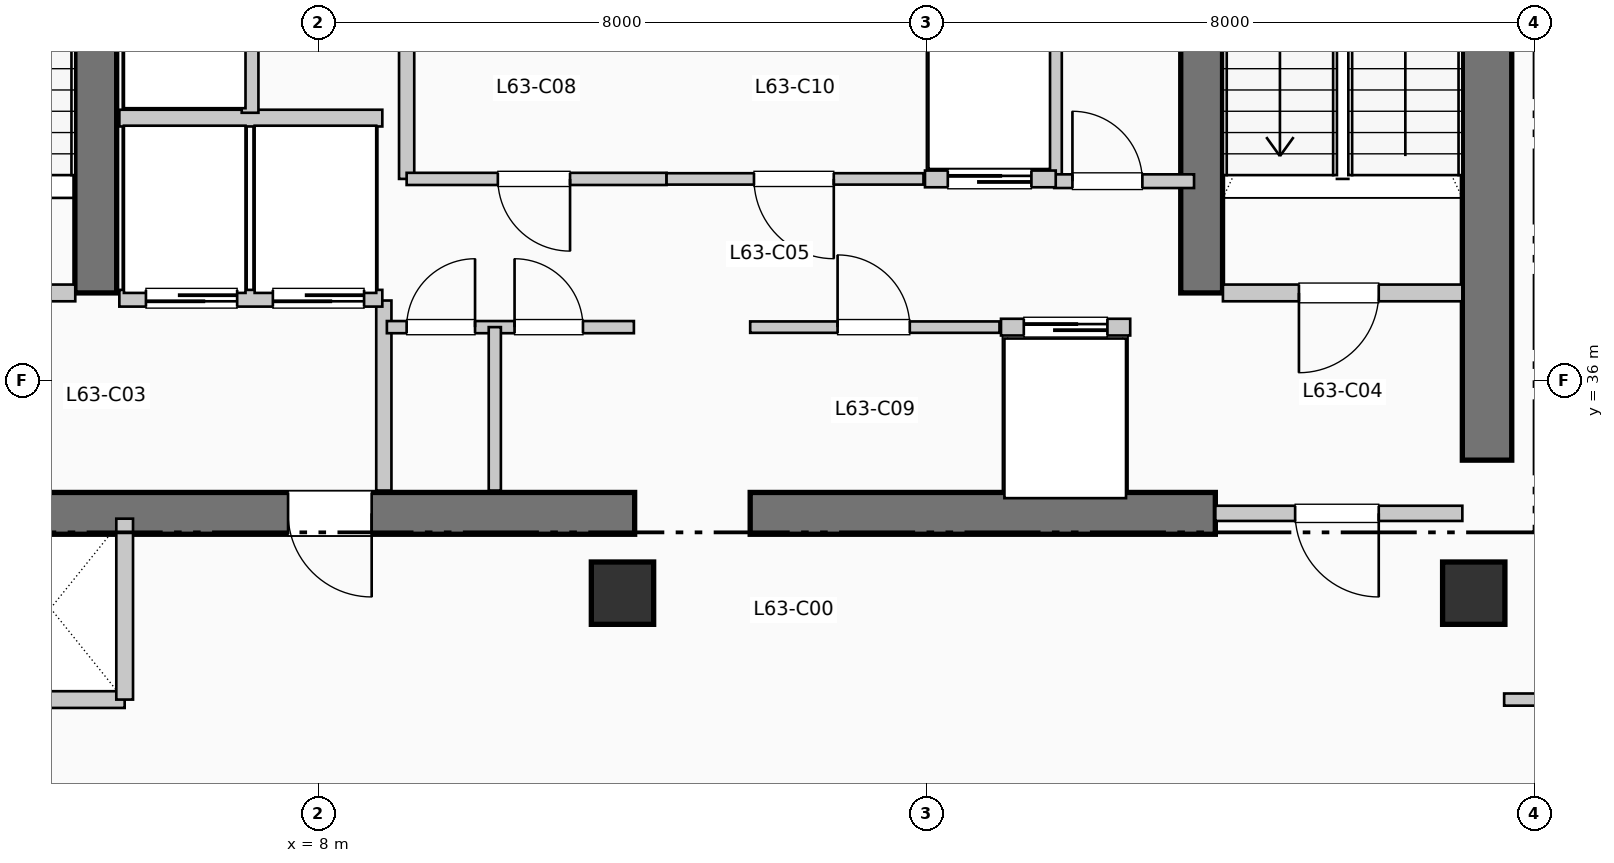
"""IFC4 building model, lengths in metres.
Left out: names, types, materials, properties, quantities, classifications, styles, units other than length and angle.
Written with IfcOpenShell. Run it as: python <this file> out.ifc"""

import sys

from ifc_helpers import new_model, si_unit, direction, frame, frame_2d, origin, origin_2d, place, context, subcontext, project, spatial, rectangle, extrude, element, fill, save


model = new_model("IFC4")
c1 = context("Model", 3, precision=1e-05, world=origin(), true_north=direction((0.0, 1.0)))
c2 = subcontext(c1, "Body", "Model", "MODEL_VIEW")
j1 = project(units=[si_unit("LENGTHUNIT", "METRE"), si_unit("PLANEANGLEUNIT", "RADIAN")], contexts=[c1])
p1 = place(None, origin())
s1 = spatial("IfcSite", under=j1, at=p1, CompositionType="ELEMENT")
p2 = place(p1, origin())
s2 = spatial("IfcBuilding", under=s1, at=p2, CompositionType="ELEMENT")
p3 = place(p2, frame((0.0, 0.0, 260.37)))
s3 = spatial("IfcBuildingStorey", under=s2, at=p3, CompositionType="ELEMENT", Elevation=260.37)
p4 = place(p3, frame((23.375, 34.95, 0.0), z_axis=(0.0, 0.0, 1.0), x_axis=(0.0, 1.0, 0.0)))
e1 = element("IfcWall", 1, at=p4, inside=s3, PredefinedType="SHEAR", context=c2, shape_type="SweptSolid", body=[
    extrude(rectangle(XDim=10.64, YDim=0.65, at=frame_2d((5.32, 0.0))), origin(), (0.0, 0.0, 1.0), 3.96),
])
p5 = place(p3, frame((1.45, 34.25, 0.0), z_axis=(0.0, 0.0, 1.0), x_axis=(1.0, 0.0, 0.0)))
e2 = element("IfcWall", 2, at=p5, inside=s3, PredefinedType="SHEAR", context=c2, shape_type="SweptSolid", body=[
    extrude(rectangle(XDim=10.71, YDim=0.55, at=frame_2d((5.355, 0.0))), origin(), (0.0, 0.0, 1.0), 3.96),
])
p6 = place(p5, frame((7.25, 0.0, 0.0), z_axis=(0.0, 0.0, 1.0), x_axis=(-1.0, 0.0, 0.0)))
e3 = element("IfcOpeningElement", 3, at=p6, cuts=e2, PredefinedType="OPENING", context=c2, shape_type="SweptSolid", body=[
    extrude(rectangle(XDim=1.1, YDim=2.15, at=frame_2d((0.55, 1.075))), frame((0.0, 0.285, 0.0), z_axis=(0.0, -1.0, 0.0), x_axis=(1.0, 0.0, 0.0)), (0.0, 0.0, 1.0), 0.57),
])
p7 = place(p3, frame((13.68, 34.25, 0.0), z_axis=(0.0, 0.0, 1.0), x_axis=(1.0, 0.0, 0.0)))
e4 = element("IfcWall", 4, at=p7, inside=s3, PredefinedType="SHEAR", context=c2, shape_type="SweptSolid", body=[
    extrude(rectangle(XDim=6.12, YDim=0.55, at=frame_2d((3.06, 0.0))), origin(), (0.0, 0.0, 1.0), 3.96),
])
for number, where, z_axis, x_axis in (
    (5, (5.07, 37.15, 0.0), (0.0, 0.0, 1.0), (0.0, 1.0, 0.0)),
    (6, (19.62, 37.15, 0.0), (0.0, 0.0, 1.0), (0.0, 1.0, 0.0)),
):
    element("IfcWall", number, at=place(p3, frame(where, z_axis=z_axis, x_axis=x_axis)), inside=s3, PredefinedType="SHEAR", context=c2, shape_type="SweptSolid", body=[
        extrude(rectangle(XDim=7.89, YDim=0.55, at=frame_2d((3.945, 0.0))), origin(), (0.0, 0.0, 1.0), 3.96),
    ])
for number, where, z_axis, x_axis in (
    (7, (12.0, 33.2, 0.0), (0.0, 0.0, 1.0), (1.0, 0.0, 0.0)),
    (8, (23.2, 33.2, 0.0), (0.0, 0.0, 1.0), (1.0, 0.0, 0.0)),
):
    element("IfcColumn", number, at=place(p3, frame(where, z_axis=z_axis, x_axis=x_axis)), inside=s3, PredefinedType="COLUMN", context=c2, shape_type="SweptSolid", body=[
        extrude(rectangle(XDim=0.82, YDim=0.82, at=origin_2d()), origin(), (0.0, 0.0, 1.0), 3.96),
    ])
p8 = place(p3, frame((1.65, 37.15, 0.0), z_axis=(0.0, 0.0, 1.0), x_axis=(1.0, 0.0, 0.0)))
e9 = element("IfcWall", 9, at=p8, inside=s3, PredefinedType="PARTITIONING", context=c2, shape_type="SweptSolid", body=[
    extrude(rectangle(XDim=3.15, YDim=0.22, at=frame_2d((1.575, 0.0))), origin(), (0.0, 0.0, 1.0), 3.71),
])
p9 = place(p8, frame((2.05, 0.0, 0.0), z_axis=(0.0, 0.0, 1.0), x_axis=(-1.0, 0.0, 0.0)))
e10 = element("IfcOpeningElement", 10, at=p9, cuts=e9, PredefinedType="OPENING", context=c2, shape_type="SweptSolid", body=[
    extrude(rectangle(XDim=1.05, YDim=2.15, at=frame_2d((0.525, 1.075))), frame((0.0, 0.12, 0.0), z_axis=(0.0, -1.0, 0.0), x_axis=(1.0, 0.0, 0.0)), (0.0, 0.0, 1.0), 0.24),
])
p10 = place(p3, frame((8.86, 34.55, 0.0), z_axis=(0.0, 0.0, 1.0), x_axis=(0.0, 1.0, 0.0)))
e11 = element("IfcWall", 11, at=p10, inside=s3, PredefinedType="PARTITIONING", context=c2, shape_type="SweptSolid", body=[
    extrude(rectangle(XDim=2.5, YDim=0.2, at=frame_2d((1.25, 0.0))), origin(), (0.0, 0.0, 1.0), 3.71),
])
p11 = place(p3, frame((19.9, 37.15, 0.0), z_axis=(0.0, 0.0, 1.0), x_axis=(1.0, 0.0, 0.0)))
e12 = element("IfcWall", 12, at=p11, inside=s3, PredefinedType="PARTITIONING", context=c2, shape_type="SweptSolid", body=[
    extrude(rectangle(XDim=3.15, YDim=0.22, at=frame_2d((1.575, 0.0))), origin(), (0.0, 0.0, 1.0), 3.71),
])
p12 = place(p11, frame((2.05, 0.0, 0.0), z_axis=(0.0, 0.0, 1.0), x_axis=(-1.0, 0.0, 0.0)))
e13 = element("IfcOpeningElement", 13, at=p12, cuts=e12, PredefinedType="OPENING", context=c2, shape_type="SweptSolid", body=[
    extrude(rectangle(XDim=1.05, YDim=2.15, at=frame_2d((0.525, 1.075))), frame((0.0, 0.12, 0.0), z_axis=(0.0, -1.0, 0.0), x_axis=(1.0, 0.0, 0.0)), (0.0, 0.0, 1.0), 0.24),
])
p13 = place(p3, frame((19.8, 34.25, 0.0), z_axis=(0.0, 0.0, 1.0), x_axis=(1.0, 0.0, 0.0)))
e14 = element("IfcWall", 14, at=p13, inside=s3, PredefinedType="PARTITIONING", context=c2, shape_type="SweptSolid", body=[
    extrude(rectangle(XDim=3.25, YDim=0.2, at=frame_2d((1.625, 0.0))), origin(), (0.0, 0.0, 1.0), 3.71),
])
p14 = place(p13, frame((2.15, 0.0, 0.0), z_axis=(0.0, 0.0, 1.0), x_axis=(-1.0, 0.0, 0.0)))
e15 = element("IfcOpeningElement", 15, at=p14, cuts=e14, PredefinedType="OPENING", context=c2, shape_type="SweptSolid", body=[
    extrude(rectangle(XDim=1.1, YDim=2.15, at=frame_2d((0.55, 1.075))), frame((0.0, 0.11, 0.0), z_axis=(0.0, -1.0, 0.0), x_axis=(1.0, 0.0, 0.0)), (0.0, 0.0, 1.0), 0.22),
])
p15 = place(p3, frame((5.38, 37.08, 0.0), z_axis=(0.0, 0.0, 1.0), x_axis=(1.0, 0.0, 0.0)))
e16 = element("IfcWall", 16, at=p15, inside=s3, PredefinedType="PARTITIONING", context=c2, shape_type="SweptSolid", body=[
    extrude(rectangle(XDim=3.46, YDim=0.22, at=frame_2d((1.73, 0.0))), origin(), (0.0, 0.0, 1.0), 3.71),
])
p16 = place(p15, frame((1.55, 0.0, 0.0), z_axis=(0.0, 0.0, 1.0), x_axis=(-1.0, 0.0, 0.0)))
e17 = element("IfcOpeningElement", 17, at=p16, cuts=e16, PredefinedType="OPENING", context=c2, shape_type="SweptSolid", body=[
    extrude(rectangle(XDim=1.2, YDim=2.2, at=frame_2d((0.6, 1.1))), frame((0.0, 0.12, 0.0), z_axis=(0.0, -1.0, 0.0), x_axis=(1.0, 0.0, 0.0)), (0.0, 0.0, 1.0), 0.24),
])
p17 = place(p15, frame((3.22, 0.0, 0.0), z_axis=(0.0, 0.0, 1.0), x_axis=(-1.0, 0.0, 0.0)))
e18 = element("IfcOpeningElement", 18, at=p17, cuts=e16, PredefinedType="OPENING", context=c2, shape_type="SweptSolid", body=[
    extrude(rectangle(XDim=1.2, YDim=2.2, at=frame_2d((0.6, 1.1))), frame((0.0, 0.12, 0.0), z_axis=(0.0, -1.0, 0.0), x_axis=(1.0, 0.0, 0.0)), (0.0, 0.0, 1.0), 0.24),
])
p18 = place(p3, frame((5.38, 39.45, 0.0), z_axis=(0.0, 0.0, 1.0), x_axis=(1.0, 0.0, 0.0)))
e19 = element("IfcWall", 19, at=p18, inside=s3, PredefinedType="PARTITIONING", context=c2, shape_type="SweptSolid", body=[
    extrude(rectangle(XDim=3.46, YDim=0.22, at=frame_2d((1.73, 0.0))), origin(), (0.0, 0.0, 1.0), 3.71),
])
p19 = place(p3, frame((7.1, 39.52, 0.0), z_axis=(0.0, 0.0, 1.0), x_axis=(0.0, 1.0, 0.0)))
e20 = element("IfcWall", 20, at=p19, inside=s3, PredefinedType="PARTITIONING", context=c2, shape_type="SweptSolid", body=[
    extrude(rectangle(XDim=2.93, YDim=0.22, at=frame_2d((1.465, 0.0))), origin(), (0.0, 0.0, 1.0), 3.71),
])
p20 = place(p19, frame((0.85, 0.0, 0.0)))
e21 = element("IfcOpeningElement", 21, at=p20, cuts=e20, PredefinedType="OPENING", context=c2, shape_type="SweptSolid", body=[
    extrude(rectangle(XDim=1.1, YDim=2.2, at=frame_2d((0.55, 1.1))), frame((0.0, 0.12, 0.0), z_axis=(0.0, -1.0, 0.0), x_axis=(1.0, 0.0, 0.0)), (0.0, 0.0, 1.0), 0.24),
])
p21 = place(p3, frame((1.55, 31.8, 0.0), z_axis=(0.0, 0.0, 1.0), x_axis=(1.0, 0.0, 0.0)))
e22 = element("IfcWall", 22, at=p21, inside=s3, PredefinedType="PARTITIONING", context=c2, shape_type="SweptSolid", body=[
    extrude(rectangle(XDim=3.9, YDim=0.22, at=frame_2d((1.95, 0.0))), origin(), (0.0, 0.0, 1.0), 3.71),
])
p22 = place(p3, frame((5.45, 31.8, 0.0), z_axis=(0.0, 0.0, 1.0), x_axis=(0.0, 1.0, 0.0)))
e23 = element("IfcWall", 23, at=p22, inside=s3, PredefinedType="PARTITIONING", context=c2, shape_type="SweptSolid", body=[
    extrude(rectangle(XDim=2.38, YDim=0.22, at=frame_2d((1.19, 0.0))), origin(), (0.0, 0.0, 1.0), 3.71),
])
for number, where, z_axis, x_axis in (
    (24, (9.16, 38.65, 0.0), (0.0, 0.0, 1.0), (0.0, 1.0, 0.0)),
    (25, (17.68, 38.65, 0.0), (0.0, 0.0, 1.0), (0.0, 1.0, 0.0)),
):
    element("IfcWall", number, at=place(p3, frame(where, z_axis=z_axis, x_axis=x_axis)), inside=s3, PredefinedType="PARTITIONING", context=c2, shape_type="SweptSolid", body=[
        extrude(rectangle(XDim=2.35, YDim=0.2, at=frame_2d((1.175, 0.0))), origin(), (0.0, 0.0, 1.0), 3.71),
    ])
p23 = place(p3, frame((17.68, 38.62, 0.0), z_axis=(0.0, 0.0, 1.0), x_axis=(1.0, 0.0, 0.0)))
e26 = element("IfcWall", 26, at=p23, inside=s3, PredefinedType="PARTITIONING", context=c2, shape_type="SweptSolid", body=[
    extrude(rectangle(XDim=1.84, YDim=0.18, at=frame_2d((0.92, 0.0))), origin(), (0.0, 0.0, 1.0), 3.71),
])
p24 = place(p23, frame((0.24, 0.0, 0.0)))
e27 = element("IfcOpeningElement", 27, at=p24, cuts=e26, PredefinedType="OPENING", context=c2, shape_type="SweptSolid", body=[
    extrude(rectangle(XDim=0.92, YDim=2.1, at=frame_2d((0.46, 1.05))), frame((0.0, 0.1, 0.0), z_axis=(0.0, -1.0, 0.0), x_axis=(1.0, 0.0, 0.0)), (0.0, 0.0, 1.0), 0.2),
])
p25 = place(p3, frame((8.9, 36.7, 0.0), z_axis=(0.0, 0.0, 1.0), x_axis=(1.0, 0.0, 0.0)))
e28 = element("IfcWall", 28, at=p25, inside=s3, PredefinedType="PARTITIONING", context=c2, shape_type="SweptSolid", body=[
    extrude(rectangle(XDim=3.25, YDim=0.16, at=frame_2d((1.625, 0.0))), origin(), (0.0, 0.0, 1.0), 3.71),
])
p26 = place(p25, frame((0.26, 0.0, 0.0)))
e29 = element("IfcOpeningElement", 29, at=p26, cuts=e28, PredefinedType="OPENING", context=c2, shape_type="SweptSolid", body=[
    extrude(rectangle(XDim=0.9, YDim=2.15, at=frame_2d((0.45, 1.075))), frame((0.0, 0.09, 0.0), z_axis=(0.0, -1.0, 0.0), x_axis=(1.0, 0.0, 0.0)), (0.0, 0.0, 1.0), 0.18),
])
p27 = place(p25, frame((1.68, 0.0, 0.0)))
e30 = element("IfcOpeningElement", 30, at=p27, cuts=e28, PredefinedType="OPENING", context=c2, shape_type="SweptSolid", body=[
    extrude(rectangle(XDim=0.9, YDim=2.15, at=frame_2d((0.45, 1.075))), frame((0.0, 0.09, 0.0), z_axis=(0.0, -1.0, 0.0), x_axis=(1.0, 0.0, 0.0)), (0.0, 0.0, 1.0), 0.18),
])
p28 = place(p3, frame((10.32, 34.55, 0.0), z_axis=(0.0, 0.0, 1.0), x_axis=(0.0, 1.0, 0.0)))
e31 = element("IfcWall", 31, at=p28, inside=s3, PredefinedType="PARTITIONING", context=c2, shape_type="SweptSolid", body=[
    extrude(rectangle(XDim=2.15, YDim=0.16, at=frame_2d((1.075, 0.0))), origin(), (0.0, 0.0, 1.0), 3.71),
])
p29 = place(p3, frame((9.16, 38.65, 0.0), z_axis=(0.0, 0.0, 1.0), x_axis=(1.0, 0.0, 0.0)))
e32 = element("IfcWall", 32, at=p29, inside=s3, PredefinedType="PARTITIONING", context=c2, shape_type="SweptSolid", body=[
    extrude(rectangle(XDim=3.42, YDim=0.16, at=frame_2d((1.71, 0.0))), origin(), (0.0, 0.0, 1.0), 3.71),
])
p30 = place(p29, frame((2.15, 0.0, 0.0), z_axis=(0.0, 0.0, 1.0), x_axis=(-1.0, 0.0, 0.0)))
e33 = element("IfcOpeningElement", 33, at=p30, cuts=e32, PredefinedType="OPENING", context=c2, shape_type="SweptSolid", body=[
    extrude(rectangle(XDim=0.95, YDim=2.15, at=frame_2d((0.475, 1.075))), frame((0.0, 0.09, 0.0), z_axis=(0.0, -1.0, 0.0), x_axis=(1.0, 0.0, 0.0)), (0.0, 0.0, 1.0), 0.18),
])
p31 = place(p3, frame((13.68, 36.7, 0.0), z_axis=(0.0, 0.0, 1.0), x_axis=(1.0, 0.0, 0.0)))
e34 = element("IfcWall", 34, at=p31, inside=s3, PredefinedType="PARTITIONING", context=c2, shape_type="SweptSolid", body=[
    extrude(rectangle(XDim=3.28, YDim=0.15, at=frame_2d((1.64, 0.0))), origin(), (0.0, 0.0, 1.0), 3.71),
])
p32 = place(p31, frame((1.15, 0.0, 0.0)))
e35 = element("IfcOpeningElement", 35, at=p32, cuts=e34, PredefinedType="OPENING", context=c2, shape_type="SweptSolid", body=[
    extrude(rectangle(XDim=0.95, YDim=2.15, at=frame_2d((0.475, 1.075))), frame((0.0, 0.085, 0.0), z_axis=(0.0, -1.0, 0.0), x_axis=(1.0, 0.0, 0.0)), (0.0, 0.0, 1.0), 0.17),
])
p33 = place(p3, frame((12.58, 38.65, 0.0), z_axis=(0.0, 0.0, 1.0), x_axis=(1.0, 0.0, 0.0)))
e36 = element("IfcWall", 36, at=p33, inside=s3, PredefinedType="PARTITIONING", context=c2, shape_type="SweptSolid", body=[
    extrude(rectangle(XDim=3.38, YDim=0.15, at=frame_2d((1.69, 0.0))), origin(), (0.0, 0.0, 1.0), 3.71),
])
p34 = place(p33, frame((2.2, 0.0, 0.0), z_axis=(0.0, 0.0, 1.0), x_axis=(-1.0, 0.0, 0.0)))
e37 = element("IfcOpeningElement", 37, at=p34, cuts=e36, PredefinedType="OPENING", context=c2, shape_type="SweptSolid", body=[
    extrude(rectangle(XDim=1.05, YDim=2.15, at=frame_2d((0.525, 1.075))), frame((0.0, 0.085, 0.0), z_axis=(0.0, -1.0, 0.0), x_axis=(1.0, 0.0, 0.0)), (0.0, 0.0, 1.0), 0.17),
])
p35 = place(p3, frame((16.98, 36.7, 0.0), z_axis=(0.0, 0.0, 1.0), x_axis=(1.0, 0.0, 0.0)))
e38 = element("IfcWall", 38, at=p35, inside=s3, PredefinedType="PARTITIONING", context=c2, shape_type="SweptSolid", body=[
    extrude(rectangle(XDim=1.7, YDim=0.22, at=frame_2d((0.85, 0.0))), origin(), (0.0, 0.0, 1.0), 3.71),
])
p36 = place(p35, frame((0.3, 0.0, 0.0)))
e39 = element("IfcOpeningElement", 39, at=p36, cuts=e38, PredefinedType="OPENING", context=c2, shape_type="SweptSolid", body=[
    extrude(rectangle(XDim=1.1, YDim=2.2, at=frame_2d((0.55, 1.1))), frame((0.0, 0.12, 0.0), z_axis=(0.0, -1.0, 0.0), x_axis=(1.0, 0.0, 0.0)), (0.0, 0.0, 1.0), 0.24),
])
p37 = place(p3, frame((15.98, 38.65, 0.0), z_axis=(0.0, 0.0, 1.0), x_axis=(1.0, 0.0, 0.0)))
e40 = element("IfcWall", 40, at=p37, inside=s3, PredefinedType="PARTITIONING", context=c2, shape_type="SweptSolid", body=[
    extrude(rectangle(XDim=1.72, YDim=0.22, at=frame_2d((0.86, 0.0))), origin(), (0.0, 0.0, 1.0), 3.71),
])
p38 = place(p37, frame((0.3, 0.0, 0.0)))
e41 = element("IfcOpeningElement", 41, at=p38, cuts=e40, PredefinedType="OPENING", context=c2, shape_type="SweptSolid", body=[
    extrude(rectangle(XDim=1.1, YDim=2.2, at=frame_2d((0.55, 1.1))), frame((0.0, 0.12, 0.0), z_axis=(0.0, -1.0, 0.0), x_axis=(1.0, 0.0, 0.0)), (0.0, 0.0, 1.0), 0.24),
])
p39 = place(p3, frame((23.6, 31.8, 0.0), z_axis=(0.0, 0.0, 1.0), x_axis=(1.0, 0.0, 0.0)))
e42 = element("IfcWall", 42, at=p39, inside=s3, PredefinedType="PARTITIONING", context=c2, shape_type="SweptSolid", body=[
    extrude(rectangle(XDim=26.41, YDim=0.16, at=frame_2d((13.205, 0.0))), origin(), (0.0, 0.0, 1.0), 3.71),
])
p40 = place(p39, frame((4.279, 0.0, 0.0)))
e43 = element("IfcOpeningElement", 43, at=p40, cuts=e42, PredefinedType="OPENING", context=c2, shape_type="SweptSolid", body=[
    extrude(rectangle(XDim=0.95, YDim=2.15, at=frame_2d((0.475, 1.075))), frame((0.0, 0.09, 0.0), z_axis=(0.0, -1.0, 0.0), x_axis=(1.0, 0.0, 0.0)), (0.0, 0.0, 1.0), 0.18),
])
p41 = place(p39, frame((13.786, 0.0, 0.0)))
e44 = element("IfcOpeningElement", 44, at=p41, cuts=e42, PredefinedType="OPENING", context=c2, shape_type="SweptSolid", body=[
    extrude(rectangle(XDim=0.95, YDim=2.15, at=frame_2d((0.475, 1.075))), frame((0.0, 0.09, 0.0), z_axis=(0.0, -1.0, 0.0), x_axis=(1.0, 0.0, 0.0)), (0.0, 0.0, 1.0), 0.18),
])
p42 = place(p39, frame((22.238, 0.0, 0.0)))
e45 = element("IfcOpeningElement", 45, at=p42, cuts=e42, PredefinedType="OPENING", context=c2, shape_type="SweptSolid", body=[
    extrude(rectangle(XDim=0.95, YDim=2.15, at=frame_2d((0.475, 1.075))), frame((0.0, 0.09, 0.0), z_axis=(0.0, -1.0, 0.0), x_axis=(1.0, 0.0, 0.0)), (0.0, 0.0, 1.0), 0.18),
])
p43 = place(p6, origin())
e46 = element("IfcDoor", 46, at=p43, inside=s3, OperationType="SINGLE_SWING_RIGHT", PredefinedType="DOOR", context=c2, shape_type="SweptSolid", body=[
    extrude(rectangle(XDim=1.1, YDim=2.15, at=frame_2d((0.55, 1.075))), frame((0.0, 0.025, 0.0), z_axis=(0.0, -1.0, 0.0), x_axis=(1.0, 0.0, 0.0)), (0.0, 0.0, 1.0), 0.05),
])
fill(e3, e46)
p44 = place(p12, origin())
e47 = element("IfcDoor", 47, at=p44, inside=s3, OperationType="SINGLE_SWING_LEFT", PredefinedType="DOOR", context=c2, shape_type="SweptSolid", body=[
    extrude(rectangle(XDim=1.05, YDim=2.15, at=frame_2d((0.525, 1.075))), frame((0.0, 0.025, 0.0), z_axis=(0.0, -1.0, 0.0), x_axis=(1.0, 0.0, 0.0)), (0.0, 0.0, 1.0), 0.05),
])
fill(e13, e47)
p45 = place(p14, origin())
e48 = element("IfcDoor", 48, at=p45, inside=s3, OperationType="SINGLE_SWING_RIGHT", PredefinedType="DOOR", context=c2, shape_type="SweptSolid", body=[
    extrude(rectangle(XDim=1.1, YDim=2.15, at=frame_2d((0.55, 1.075))), frame((0.0, 0.025, 0.0), z_axis=(0.0, -1.0, 0.0), x_axis=(1.0, 0.0, 0.0)), (0.0, 0.0, 1.0), 0.05),
])
fill(e15, e48)
p46 = place(p16, origin())
e49 = element("IfcDoor", 49, at=p46, inside=s3, OperationType="SLIDING_TO_RIGHT", PredefinedType="DOOR", context=c2, shape_type="SweptSolid", body=[
    extrude(rectangle(XDim=1.2, YDim=2.2, at=frame_2d((0.6, 1.1))), frame((0.0, 0.025, 0.0), z_axis=(0.0, -1.0, 0.0), x_axis=(1.0, 0.0, 0.0)), (0.0, 0.0, 1.0), 0.05),
])
fill(e17, e49)
p47 = place(p17, origin())
e50 = element("IfcDoor", 50, at=p47, inside=s3, OperationType="SLIDING_TO_RIGHT", PredefinedType="DOOR", context=c2, shape_type="SweptSolid", body=[
    extrude(rectangle(XDim=1.2, YDim=2.2, at=frame_2d((0.6, 1.1))), frame((0.0, 0.025, 0.0), z_axis=(0.0, -1.0, 0.0), x_axis=(1.0, 0.0, 0.0)), (0.0, 0.0, 1.0), 0.05),
])
fill(e18, e50)
p48 = place(p24, origin())
e51 = element("IfcDoor", 51, at=p48, inside=s3, OperationType="SINGLE_SWING_LEFT", PredefinedType="DOOR", context=c2, shape_type="SweptSolid", body=[
    extrude(rectangle(XDim=0.92, YDim=2.1, at=frame_2d((0.46, 1.05))), frame((0.0, 0.025, 0.0), z_axis=(0.0, -1.0, 0.0), x_axis=(1.0, 0.0, 0.0)), (0.0, 0.0, 1.0), 0.05),
])
fill(e27, e51)
p49 = place(p26, origin())
e52 = element("IfcDoor", 52, at=p49, inside=s3, OperationType="SINGLE_SWING_RIGHT", PredefinedType="DOOR", context=c2, shape_type="SweptSolid", body=[
    extrude(rectangle(XDim=0.9, YDim=2.15, at=frame_2d((0.45, 1.075))), frame((0.0, 0.025, 0.0), z_axis=(0.0, -1.0, 0.0), x_axis=(1.0, 0.0, 0.0)), (0.0, 0.0, 1.0), 0.05),
])
fill(e29, e52)
p50 = place(p27, origin())
e53 = element("IfcDoor", 53, at=p50, inside=s3, OperationType="SINGLE_SWING_LEFT", PredefinedType="DOOR", context=c2, shape_type="SweptSolid", body=[
    extrude(rectangle(XDim=0.9, YDim=2.15, at=frame_2d((0.45, 1.075))), frame((0.0, 0.025, 0.0), z_axis=(0.0, -1.0, 0.0), x_axis=(1.0, 0.0, 0.0)), (0.0, 0.0, 1.0), 0.05),
])
fill(e30, e53)
p51 = place(p30, origin())
e54 = element("IfcDoor", 54, at=p51, inside=s3, OperationType="SINGLE_SWING_RIGHT", PredefinedType="DOOR", context=c2, shape_type="SweptSolid", body=[
    extrude(rectangle(XDim=0.95, YDim=2.15, at=frame_2d((0.475, 1.075))), frame((0.0, 0.025, 0.0), z_axis=(0.0, -1.0, 0.0), x_axis=(1.0, 0.0, 0.0)), (0.0, 0.0, 1.0), 0.05),
])
fill(e33, e54)
p52 = place(p32, origin())
e55 = element("IfcDoor", 55, at=p52, inside=s3, OperationType="SINGLE_SWING_LEFT", PredefinedType="DOOR", context=c2, shape_type="SweptSolid", body=[
    extrude(rectangle(XDim=0.95, YDim=2.15, at=frame_2d((0.475, 1.075))), frame((0.0, 0.025, 0.0), z_axis=(0.0, -1.0, 0.0), x_axis=(1.0, 0.0, 0.0)), (0.0, 0.0, 1.0), 0.05),
])
fill(e35, e55)
p53 = place(p34, origin())
e56 = element("IfcDoor", 56, at=p53, inside=s3, OperationType="SINGLE_SWING_RIGHT", PredefinedType="DOOR", context=c2, shape_type="SweptSolid", body=[
    extrude(rectangle(XDim=1.05, YDim=2.15, at=frame_2d((0.525, 1.075))), frame((0.0, 0.025, 0.0), z_axis=(0.0, -1.0, 0.0), x_axis=(1.0, 0.0, 0.0)), (0.0, 0.0, 1.0), 0.05),
])
fill(e37, e56)
p54 = place(p36, origin())
e57 = element("IfcDoor", 57, at=p54, inside=s3, OperationType="SLIDING_TO_LEFT", PredefinedType="DOOR", context=c2, shape_type="SweptSolid", body=[
    extrude(rectangle(XDim=1.1, YDim=2.2, at=frame_2d((0.55, 1.1))), frame((0.0, 0.025, 0.0), z_axis=(0.0, -1.0, 0.0), x_axis=(1.0, 0.0, 0.0)), (0.0, 0.0, 1.0), 0.05),
])
fill(e39, e57)
p55 = place(p38, origin())
e58 = element("IfcDoor", 58, at=p55, inside=s3, OperationType="SLIDING_TO_LEFT", PredefinedType="DOOR", context=c2, shape_type="SweptSolid", body=[
    extrude(rectangle(XDim=1.1, YDim=2.2, at=frame_2d((0.55, 1.1))), frame((0.0, 0.025, 0.0), z_axis=(0.0, -1.0, 0.0), x_axis=(1.0, 0.0, 0.0)), (0.0, 0.0, 1.0), 0.05),
])
fill(e41, e58)
save(model, sys.argv[1])
